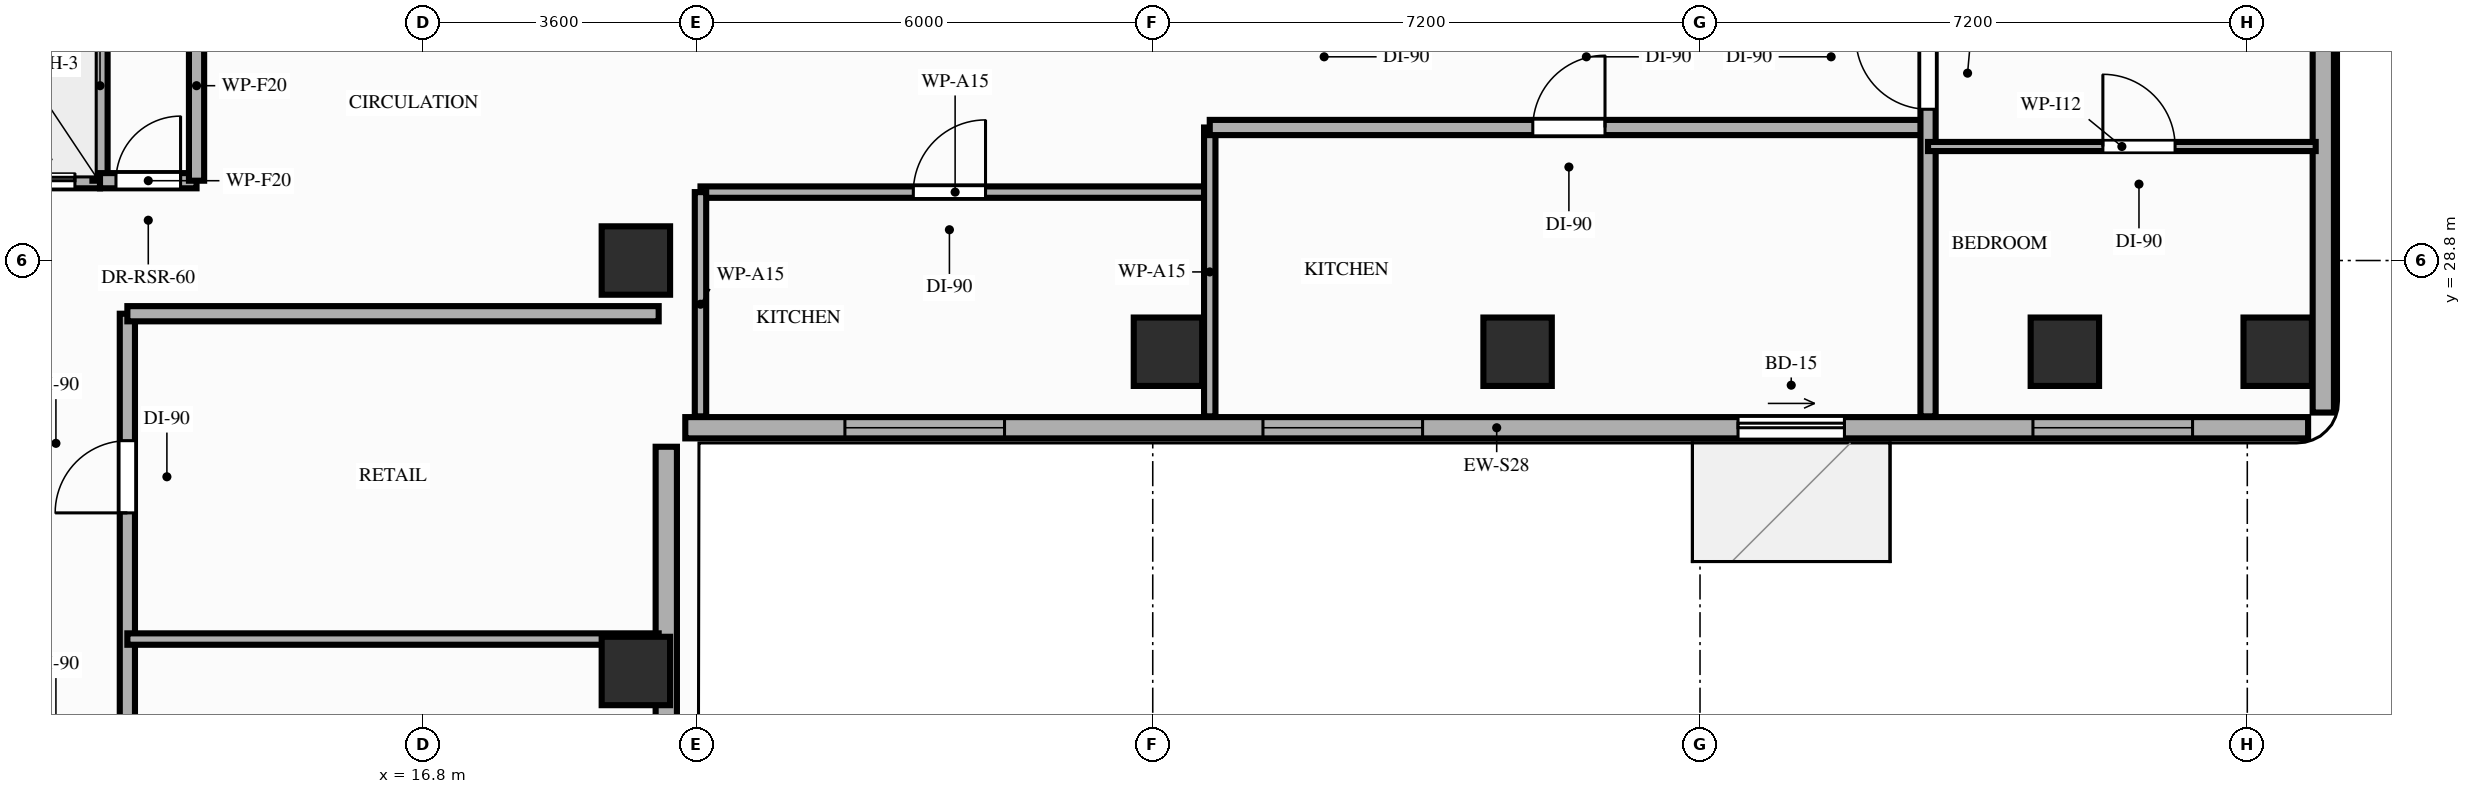
"""IFC4 building model, lengths in metres.
Left out: names, types, materials, properties, quantities, classifications, styles, units other than length and angle.
Written with IfcOpenShell. Run it as: python <this file> out.ifc"""

import sys

from ifc_helpers import new_model, si_unit, direction, frame, frame_2d, origin, origin_2d, place, context, subcontext, project, spatial, rectangle, extrude, element, fill, save


model = new_model("IFC4")
c1 = context("Model", 3, precision=1e-05, world=origin(), true_north=direction((0.0, 1.0)))
c2 = subcontext(c1, "Body", "Model", "MODEL_VIEW")
j1 = project(units=[si_unit("LENGTHUNIT", "METRE"), si_unit("PLANEANGLEUNIT", "RADIAN")], contexts=[c1])
p1 = place(None, origin())
s1 = spatial("IfcSite", under=j1, at=p1, CompositionType="ELEMENT")
p2 = place(p1, origin())
s2 = spatial("IfcBuilding", under=s1, at=p2, CompositionType="ELEMENT")
p3 = place(p2, frame((0.0, 0.0, 198.4)))
s3 = spatial("IfcBuildingStorey", under=s2, at=p3, CompositionType="ELEMENT", Elevation=198.4)
for number, where, z_axis, x_axis in (
    (1, (19.6, 23.4, 0.0), (0.0, 0.0, 1.0), (1.0, 0.0, 0.0)),
    (2, (19.6, 28.8, 0.0), (0.0, 0.0, 1.0), (1.0, 0.0, 0.0)),
    (3, (26.6, 27.6, 0.0), (0.0, 0.0, 1.0), (1.0, 0.0, 0.0)),
    (4, (31.2, 27.6, 0.0), (0.0, 0.0, 1.0), (1.0, 0.0, 0.0)),
    (5, (38.4, 27.6, 0.0), (0.0, 0.0, 1.0), (1.0, 0.0, 0.0)),
    (6, (41.2, 27.6, 0.0), (0.0, 0.0, 1.0), (1.0, 0.0, 0.0)),
):
    element("IfcColumn", number, at=place(p3, frame(where, z_axis=z_axis, x_axis=x_axis)), inside=s3, PredefinedType="COLUMN", context=c2, shape_type="SweptSolid", body=[
        extrude(rectangle(XDim=0.9, YDim=0.9, at=origin_2d()), origin(), (0.0, 0.0, 1.0), 3.2),
    ])
p4 = place(p3, frame((20.0, 8.8, 0.0), z_axis=(0.0, 0.0, 1.0), x_axis=(0.0, 1.0, 0.0)))
e7 = element("IfcWall", 7, at=p4, inside=s3, PredefinedType="STANDARD", context=c2, shape_type="SweptSolid", body=[
    extrude(rectangle(XDim=17.55, YDim=0.28, at=frame_2d((8.775, 0.0))), origin(), (0.0, 0.0, 1.0), 2.51),
])
p5 = place(p4, frame((4.58, 0.0, 0.85)))
e8 = element("IfcOpeningElement", 8, at=p5, cuts=e7, PredefinedType="OPENING", context=c2, shape_type="SweptSolid", body=[
    extrude(rectangle(XDim=0.8, YDim=1.41, at=frame_2d((0.4, 0.705))), frame((0.0, 0.15, 0.0), z_axis=(0.0, -1.0, 0.0), x_axis=(1.0, 0.0, 0.0)), (0.0, 0.0, 1.0), 0.3),
])
p6 = place(p4, frame((5.95, 0.0, 0.85)))
e9 = element("IfcOpeningElement", 9, at=p6, cuts=e7, PredefinedType="OPENING", context=c2, shape_type="SweptSolid", body=[
    extrude(rectangle(XDim=1.5, YDim=1.41, at=frame_2d((0.75, 0.705))), frame((0.0, 0.15, 0.0), z_axis=(0.0, -1.0, 0.0), x_axis=(1.0, 0.0, 0.0)), (0.0, 0.0, 1.0), 0.3),
])
p7 = place(p4, frame((10.85, 0.0, 0.85)))
e10 = element("IfcOpeningElement", 10, at=p7, cuts=e7, PredefinedType="OPENING", context=c2, shape_type="SweptSolid", body=[
    extrude(rectangle(XDim=2.1, YDim=1.41, at=frame_2d((1.05, 0.705))), frame((0.0, 0.15, 0.0), z_axis=(0.0, -1.0, 0.0), x_axis=(1.0, 0.0, 0.0)), (0.0, 0.0, 1.0), 0.3),
])
p8 = place(p3, frame((20.25, 26.6, 0.0), z_axis=(0.0, 0.0, 1.0), x_axis=(1.0, 0.0, 0.0)))
e11 = element("IfcWall", 11, at=p8, inside=s3, PredefinedType="STANDARD", context=c2, shape_type="SweptSolid", body=[
    extrude(rectangle(XDim=21.35, YDim=0.28, at=frame_2d((10.675, 0.0))), origin(), (0.0, 0.0, 1.0), 2.71),
])
p9 = place(p8, frame((13.85, 0.0, 0.0)))
e12 = element("IfcOpeningElement", 12, at=p9, cuts=e11, PredefinedType="OPENING", context=c2, shape_type="SweptSolid", body=[
    extrude(rectangle(XDim=1.4, YDim=2.1, at=frame_2d((0.7, 1.05))), frame((0.0, 0.15, 0.0), z_axis=(0.0, -1.0, 0.0), x_axis=(1.0, 0.0, 0.0)), (0.0, 0.0, 1.0), 0.3),
])
p10 = place(p8, frame((17.73, 0.0, 0.85)))
e13 = element("IfcOpeningElement", 13, at=p10, cuts=e11, PredefinedType="OPENING", context=c2, shape_type="SweptSolid", body=[
    extrude(rectangle(XDim=2.1, YDim=1.61, at=frame_2d((1.05, 0.805))), frame((0.0, 0.15, 0.0), z_axis=(0.0, -1.0, 0.0), x_axis=(1.0, 0.0, 0.0)), (0.0, 0.0, 1.0), 0.3),
])
p11 = place(p8, frame((2.1, 0.0, 0.85)))
e14 = element("IfcOpeningElement", 14, at=p11, cuts=e11, PredefinedType="OPENING", context=c2, shape_type="SweptSolid", body=[
    extrude(rectangle(XDim=2.1, YDim=1.61, at=frame_2d((1.05, 0.805))), frame((0.0, 0.15, 0.0), z_axis=(0.0, -1.0, 0.0), x_axis=(1.0, 0.0, 0.0)), (0.0, 0.0, 1.0), 0.3),
])
p12 = place(p8, frame((7.6, 0.0, 0.85)))
e15 = element("IfcOpeningElement", 15, at=p12, cuts=e11, PredefinedType="OPENING", context=c2, shape_type="SweptSolid", body=[
    extrude(rectangle(XDim=2.1, YDim=1.61, at=frame_2d((1.05, 0.805))), frame((0.0, 0.15, 0.0), z_axis=(0.0, -1.0, 0.0), x_axis=(1.0, 0.0, 0.0)), (0.0, 0.0, 1.0), 0.3),
])
p13 = place(p3, frame((41.8, 26.8, 0.0), z_axis=(0.0, 0.0, 1.0), x_axis=(0.0, 1.0, 0.0)))
e16 = element("IfcWall", 16, at=p13, inside=s3, PredefinedType="STANDARD", context=c2, shape_type="SweptSolid", body=[
    extrude(rectangle(XDim=15.35, YDim=0.28, at=frame_2d((7.675, 0.0))), origin(), (0.0, 0.0, 1.0), 3.02),
])
p14 = place(p13, frame((6.75, 0.0, 0.85)))
e17 = element("IfcOpeningElement", 17, at=p14, cuts=e16, PredefinedType="OPENING", context=c2, shape_type="SweptSolid", body=[
    extrude(rectangle(XDim=2.1, YDim=1.8, at=frame_2d((1.05, 0.9))), frame((0.0, 0.15, 0.0), z_axis=(0.0, -1.0, 0.0), x_axis=(1.0, 0.0, 0.0)), (0.0, 0.0, 1.0), 0.3),
])
p15 = place(p3, frame((7.0, 29.85, 0.0), z_axis=(0.0, 0.0, 1.0), x_axis=(1.0, 0.0, 0.0)))
e18 = element("IfcWall", 18, at=p15, inside=s3, PredefinedType="MOVABLE", context=c2, shape_type="SweptSolid", body=[
    extrude(rectangle(XDim=5.55, YDim=0.2, at=frame_2d((2.775, 0.0))), origin(), (0.0, 0.0, 1.0), 3.02),
])
p16 = place(p15, frame((0.38, 0.0, 0.0)))
e19 = element("IfcOpeningElement", 19, at=p16, cuts=e18, PredefinedType="OPENING", context=c2, shape_type="SweptSolid", body=[
    extrude(rectangle(XDim=1.05, YDim=2.15, at=frame_2d((0.525, 1.075))), frame((0.0, 0.11, 0.0), z_axis=(0.0, -1.0, 0.0), x_axis=(1.0, 0.0, 0.0)), (0.0, 0.0, 1.0), 0.22),
])
p17 = place(p15, frame((2.28, 0.0, 0.0)))
e20 = element("IfcOpeningElement", 20, at=p17, cuts=e18, PredefinedType="OPENING", context=c2, shape_type="SweptSolid", body=[
    extrude(rectangle(XDim=1.05, YDim=2.15, at=frame_2d((0.525, 1.075))), frame((0.0, 0.11, 0.0), z_axis=(0.0, -1.0, 0.0), x_axis=(1.0, 0.0, 0.0)), (0.0, 0.0, 1.0), 0.22),
])
p18 = place(p15, frame((4.17, 0.0, 0.0)))
e21 = element("IfcOpeningElement", 21, at=p18, cuts=e18, PredefinedType="OPENING", context=c2, shape_type="SweptSolid", body=[
    extrude(rectangle(XDim=1.05, YDim=2.15, at=frame_2d((0.525, 1.075))), frame((0.0, 0.11, 0.0), z_axis=(0.0, -1.0, 0.0), x_axis=(1.0, 0.0, 0.0)), (0.0, 0.0, 1.0), 0.22),
])
p19 = place(p3, frame((12.55, 29.85, 0.0), z_axis=(0.0, 0.0, 1.0), x_axis=(0.0, 1.0, 0.0)))
e22 = element("IfcWall", 22, at=p19, inside=s3, PredefinedType="MOVABLE", context=c2, shape_type="SweptSolid", body=[
    extrude(rectangle(XDim=2.5, YDim=0.2, at=frame_2d((1.25, 0.0))), origin(), (0.0, 0.0, 1.0), 3.02),
])
p20 = place(p3, frame((12.55, 29.85, 0.0), z_axis=(0.0, 0.0, 1.0), x_axis=(1.0, 0.0, 0.0)))
e23 = element("IfcWall", 23, at=p20, inside=s3, PredefinedType="PARTITIONING", context=c2, shape_type="SweptSolid", body=[
    extrude(rectangle(XDim=1.27, YDim=0.2, at=frame_2d((0.635, 0.0))), origin(), (0.0, 0.0, 1.0), 3.02),
])
p21 = place(p20, frame((0.21, 0.0, 0.0)))
e24 = element("IfcOpeningElement", 24, at=p21, cuts=e23, PredefinedType="OPENING", context=c2, shape_type="SweptSolid", body=[
    extrude(rectangle(XDim=0.85, YDim=2.05, at=frame_2d((0.425, 1.025))), frame((0.0, 0.11, 0.0), z_axis=(0.0, -1.0, 0.0), x_axis=(1.0, 0.0, 0.0)), (0.0, 0.0, 1.0), 0.22),
])
p22 = place(p3, frame((13.82, 29.85, 0.0), z_axis=(0.0, 0.0, 1.0), x_axis=(0.0, 1.0, 0.0)))
e25 = element("IfcWall", 25, at=p22, inside=s3, PredefinedType="PARTITIONING", context=c2, shape_type="SweptSolid", body=[
    extrude(rectangle(XDim=2.5, YDim=0.2, at=frame_2d((1.25, 0.0))), origin(), (0.0, 0.0, 1.0), 3.02),
])
p23 = place(p3, frame((12.91, 14.5, 0.0), z_axis=(0.0, 0.0, 1.0), x_axis=(0.0, 1.0, 0.0)))
e26 = element("IfcWall", 26, at=p23, inside=s3, PredefinedType="PARTITIONING", context=c2, shape_type="SweptSolid", body=[
    extrude(rectangle(XDim=13.6, YDim=0.2, at=frame_2d((6.8, 0.0))), origin(), (0.0, 0.0, 1.0), 2.51),
])
p24 = place(p23, frame((0.42, 0.0, 0.0)))
e27 = element("IfcOpeningElement", 27, at=p24, cuts=e26, PredefinedType="OPENING", context=c2, shape_type="SweptSolid", body=[
    extrude(rectangle(XDim=0.95, YDim=2.1, at=frame_2d((0.475, 1.05))), frame((0.0, 0.11, 0.0), z_axis=(0.0, -1.0, 0.0), x_axis=(1.0, 0.0, 0.0)), (0.0, 0.0, 1.0), 0.22),
])
p25 = place(p23, frame((5.2, 0.0, 0.0)))
e28 = element("IfcOpeningElement", 28, at=p25, cuts=e26, PredefinedType="OPENING", context=c2, shape_type="SweptSolid", body=[
    extrude(rectangle(XDim=0.95, YDim=2.15, at=frame_2d((0.475, 1.075))), frame((0.0, 0.11, 0.0), z_axis=(0.0, -1.0, 0.0), x_axis=(1.0, 0.0, 0.0)), (0.0, 0.0, 1.0), 0.22),
])
p26 = place(p23, frame((10.98, 0.0, 0.0)))
e29 = element("IfcOpeningElement", 29, at=p26, cuts=e26, PredefinedType="OPENING", context=c2, shape_type="SweptSolid", body=[
    extrude(rectangle(XDim=0.95, YDim=2.15, at=frame_2d((0.475, 1.075))), frame((0.0, 0.11, 0.0), z_axis=(0.0, -1.0, 0.0), x_axis=(1.0, 0.0, 0.0)), (0.0, 0.0, 1.0), 0.22),
])
p27 = place(p3, frame((12.91, 28.1, 0.0), z_axis=(0.0, 0.0, 1.0), x_axis=(1.0, 0.0, 0.0)))
e30 = element("IfcWall", 30, at=p27, inside=s3, PredefinedType="PARTITIONING", context=c2, shape_type="SweptSolid", body=[
    extrude(rectangle(XDim=6.99, YDim=0.2, at=frame_2d((3.495, 0.0))), origin(), (0.0, 0.0, 1.0), 2.51),
])
p28 = place(p3, frame((20.45, 29.7, 0.0), z_axis=(0.0, 0.0, 1.0), x_axis=(1.0, 0.0, 0.0)))
e31 = element("IfcWall", 31, at=p28, inside=s3, PredefinedType="PARTITIONING", context=c2, shape_type="SweptSolid", body=[
    extrude(rectangle(XDim=6.7, YDim=0.15, at=frame_2d((3.35, 0.0))), origin(), (0.0, 0.0, 1.0), 3.02),
])
p29 = place(p28, frame((2.8, 0.0, 0.0)))
e32 = element("IfcOpeningElement", 32, at=p29, cuts=e31, PredefinedType="OPENING", context=c2, shape_type="SweptSolid", body=[
    extrude(rectangle(XDim=0.95, YDim=2.15, at=frame_2d((0.475, 1.075))), frame((0.0, 0.085, 0.0), z_axis=(0.0, -1.0, 0.0), x_axis=(1.0, 0.0, 0.0)), (0.0, 0.0, 1.0), 0.17),
])
p30 = place(p3, frame((20.45, 26.75, 0.0), z_axis=(0.0, 0.0, 1.0), x_axis=(0.0, 1.0, 0.0)))
e33 = element("IfcWall", 33, at=p30, inside=s3, PredefinedType="PARTITIONING", context=c2, shape_type="SweptSolid", body=[
    extrude(rectangle(XDim=2.95, YDim=0.15, at=frame_2d((1.475, 0.0))), origin(), (0.0, 0.0, 1.0), 2.51),
])
p31 = place(p3, frame((27.15, 26.75, 0.0), z_axis=(0.0, 0.0, 1.0), x_axis=(0.0, 1.0, 0.0)))
e34 = element("IfcWall", 34, at=p31, inside=s3, PredefinedType="PARTITIONING", context=c2, shape_type="SweptSolid", body=[
    extrude(rectangle(XDim=3.8, YDim=0.15, at=frame_2d((1.9, 0.0))), origin(), (0.0, 0.0, 1.0), 2.51),
])
p32 = place(p3, frame((12.91, 23.82, 0.0), z_axis=(0.0, 0.0, 1.0), x_axis=(1.0, 0.0, 0.0)))
e35 = element("IfcWall", 35, at=p32, inside=s3, PredefinedType="PARTITIONING", context=c2, shape_type="SweptSolid", body=[
    extrude(rectangle(XDim=6.99, YDim=0.15, at=frame_2d((3.495, 0.0))), origin(), (0.0, 0.0, 1.0), 2.51),
])
p33 = place(p3, frame((27.15, 30.55, 0.0), z_axis=(0.0, 0.0, 1.0), x_axis=(1.0, 0.0, 0.0)))
e36 = element("IfcWall", 36, at=p33, inside=s3, PredefinedType="PARTITIONING", context=c2, shape_type="SweptSolid", body=[
    extrude(rectangle(XDim=9.45, YDim=0.2, at=frame_2d((4.725, 0.0))), origin(), (0.0, 0.0, 1.0), 2.51),
])
p34 = place(p33, frame((4.25, 0.0, 0.0)))
e37 = element("IfcOpeningElement", 37, at=p34, cuts=e36, PredefinedType="OPENING", context=c2, shape_type="SweptSolid", body=[
    extrude(rectangle(XDim=0.95, YDim=2.15, at=frame_2d((0.475, 1.075))), frame((0.0, 0.11, 0.0), z_axis=(0.0, -1.0, 0.0), x_axis=(1.0, 0.0, 0.0)), (0.0, 0.0, 1.0), 0.22),
])
p35 = place(p3, frame((36.6, 26.75, 0.0), z_axis=(0.0, 0.0, 1.0), x_axis=(0.0, 1.0, 0.0)))
e38 = element("IfcWall", 38, at=p35, inside=s3, PredefinedType="PARTITIONING", context=c2, shape_type="SweptSolid", body=[
    extrude(rectangle(XDim=15.45, YDim=0.2, at=frame_2d((7.725, 0.0))), origin(), (0.0, 0.0, 1.0), 2.51),
])
p36 = place(p35, frame((4.04, 0.0, 0.0)))
e39 = element("IfcOpeningElement", 39, at=p36, cuts=e38, PredefinedType="OPENING", context=c2, shape_type="SweptSolid", body=[
    extrude(rectangle(XDim=0.95, YDim=2.15, at=frame_2d((0.475, 1.075))), frame((0.0, 0.11, 0.0), z_axis=(0.0, -1.0, 0.0), x_axis=(1.0, 0.0, 0.0)), (0.0, 0.0, 1.0), 0.22),
])
p37 = place(p3, frame((36.6, 30.3, 0.0), z_axis=(0.0, 0.0, 1.0), x_axis=(1.0, 0.0, 0.0)))
e40 = element("IfcWall", 40, at=p37, inside=s3, PredefinedType="PARTITIONING", context=c2, shape_type="SweptSolid", body=[
    extrude(rectangle(XDim=5.1, YDim=0.12, at=frame_2d((2.55, 0.0))), origin(), (0.0, 0.0, 1.0), 2.51),
])
p38 = place(p37, frame((2.3, 0.0, 0.0)))
e41 = element("IfcOpeningElement", 41, at=p38, cuts=e40, PredefinedType="OPENING", context=c2, shape_type="SweptSolid", body=[
    extrude(rectangle(XDim=0.95, YDim=2.15, at=frame_2d((0.475, 1.075))), frame((0.0, 0.07, 0.0), z_axis=(0.0, -1.0, 0.0), x_axis=(1.0, 0.0, 0.0)), (0.0, 0.0, 1.0), 0.14),
])
p39 = place(p9, origin())
e42 = element("IfcDoor", 42, at=p39, inside=s3, OperationType="SLIDING_TO_RIGHT", PredefinedType="DOOR", context=c2, shape_type="SweptSolid", body=[
    extrude(rectangle(XDim=1.4, YDim=2.1, at=frame_2d((0.7, 1.05))), frame((0.0, 0.025, 0.0), z_axis=(0.0, -1.0, 0.0), x_axis=(1.0, 0.0, 0.0)), (0.0, 0.0, 1.0), 0.05),
])
fill(e12, e42)
p40 = place(p10, origin())
e43 = element("IfcWindow", 43, at=p40, inside=s3, PartitioningType="SINGLE_PANEL", PredefinedType="WINDOW", context=c2, shape_type="SweptSolid", body=[
    extrude(rectangle(XDim=2.1, YDim=1.61, at=frame_2d((1.05, 0.805))), frame((0.0, 0.03, 0.0), z_axis=(0.0, -1.0, 0.0), x_axis=(1.0, 0.0, 0.0)), (0.0, 0.0, 1.0), 0.06),
])
fill(e13, e43)
p41 = place(p11, origin())
e44 = element("IfcWindow", 44, at=p41, inside=s3, PartitioningType="SINGLE_PANEL", PredefinedType="WINDOW", context=c2, shape_type="SweptSolid", body=[
    extrude(rectangle(XDim=2.1, YDim=1.61, at=frame_2d((1.05, 0.805))), frame((0.0, 0.03, 0.0), z_axis=(0.0, -1.0, 0.0), x_axis=(1.0, 0.0, 0.0)), (0.0, 0.0, 1.0), 0.06),
])
fill(e14, e44)
p42 = place(p12, origin())
e45 = element("IfcWindow", 45, at=p42, inside=s3, PartitioningType="SINGLE_PANEL", PredefinedType="WINDOW", context=c2, shape_type="SweptSolid", body=[
    extrude(rectangle(XDim=2.1, YDim=1.61, at=frame_2d((1.05, 0.805))), frame((0.0, 0.03, 0.0), z_axis=(0.0, -1.0, 0.0), x_axis=(1.0, 0.0, 0.0)), (0.0, 0.0, 1.0), 0.06),
])
fill(e15, e45)
p43 = place(p18, origin())
e46 = element("IfcDoor", 46, at=p43, inside=s3, OperationType="SLIDING_TO_LEFT", PredefinedType="DOOR", context=c2, shape_type="SweptSolid", body=[
    extrude(rectangle(XDim=1.05, YDim=2.15, at=frame_2d((0.525, 1.075))), frame((0.0, 0.025, 0.0), z_axis=(0.0, -1.0, 0.0), x_axis=(1.0, 0.0, 0.0)), (0.0, 0.0, 1.0), 0.05),
])
fill(e21, e46)
p44 = place(p21, origin())
e47 = element("IfcDoor", 47, at=p44, inside=s3, OperationType="SINGLE_SWING_RIGHT", PredefinedType="DOOR", context=c2, shape_type="SweptSolid", body=[
    extrude(rectangle(XDim=0.85, YDim=2.05, at=frame_2d((0.425, 1.025))), frame((0.0, 0.025, 0.0), z_axis=(0.0, -1.0, 0.0), x_axis=(1.0, 0.0, 0.0)), (0.0, 0.0, 1.0), 0.05),
])
fill(e24, e47)
p45 = place(p29, origin())
e48 = element("IfcDoor", 48, at=p45, inside=s3, OperationType="SINGLE_SWING_RIGHT", PredefinedType="DOOR", context=c2, shape_type="SweptSolid", body=[
    extrude(rectangle(XDim=0.95, YDim=2.15, at=frame_2d((0.475, 1.075))), frame((0.0, 0.025, 0.0), z_axis=(0.0, -1.0, 0.0), x_axis=(1.0, 0.0, 0.0)), (0.0, 0.0, 1.0), 0.05),
])
fill(e32, e48)
p46 = place(p26, origin())
e49 = element("IfcDoor", 49, at=p46, inside=s3, OperationType="SINGLE_SWING_LEFT", PredefinedType="DOOR", context=c2, shape_type="SweptSolid", body=[
    extrude(rectangle(XDim=0.95, YDim=2.15, at=frame_2d((0.475, 1.075))), frame((0.0, 0.025, 0.0), z_axis=(0.0, -1.0, 0.0), x_axis=(1.0, 0.0, 0.0)), (0.0, 0.0, 1.0), 0.05),
])
fill(e29, e49)
p47 = place(p36, origin())
e50 = element("IfcDoor", 50, at=p47, inside=s3, OperationType="SINGLE_SWING_RIGHT", PredefinedType="DOOR", context=c2, shape_type="SweptSolid", body=[
    extrude(rectangle(XDim=0.95, YDim=2.15, at=frame_2d((0.475, 1.075))), frame((0.0, 0.025, 0.0), z_axis=(0.0, -1.0, 0.0), x_axis=(1.0, 0.0, 0.0)), (0.0, 0.0, 1.0), 0.05),
])
fill(e39, e50)
p48 = place(p38, origin())
e51 = element("IfcDoor", 51, at=p48, inside=s3, OperationType="SINGLE_SWING_LEFT", PredefinedType="DOOR", context=c2, shape_type="SweptSolid", body=[
    extrude(rectangle(XDim=0.95, YDim=2.15, at=frame_2d((0.475, 1.075))), frame((0.0, 0.025, 0.0), z_axis=(0.0, -1.0, 0.0), x_axis=(1.0, 0.0, 0.0)), (0.0, 0.0, 1.0), 0.05),
])
fill(e41, e51)
p49 = place(p34, origin())
e52 = element("IfcDoor", 52, at=p49, inside=s3, OperationType="SINGLE_SWING_RIGHT", PredefinedType="DOOR", context=c2, shape_type="SweptSolid", body=[
    extrude(rectangle(XDim=0.95, YDim=2.15, at=frame_2d((0.475, 1.075))), frame((0.0, 0.025, 0.0), z_axis=(0.0, -1.0, 0.0), x_axis=(1.0, 0.0, 0.0)), (0.0, 0.0, 1.0), 0.05),
])
fill(e37, e52)
save(model, sys.argv[1])
